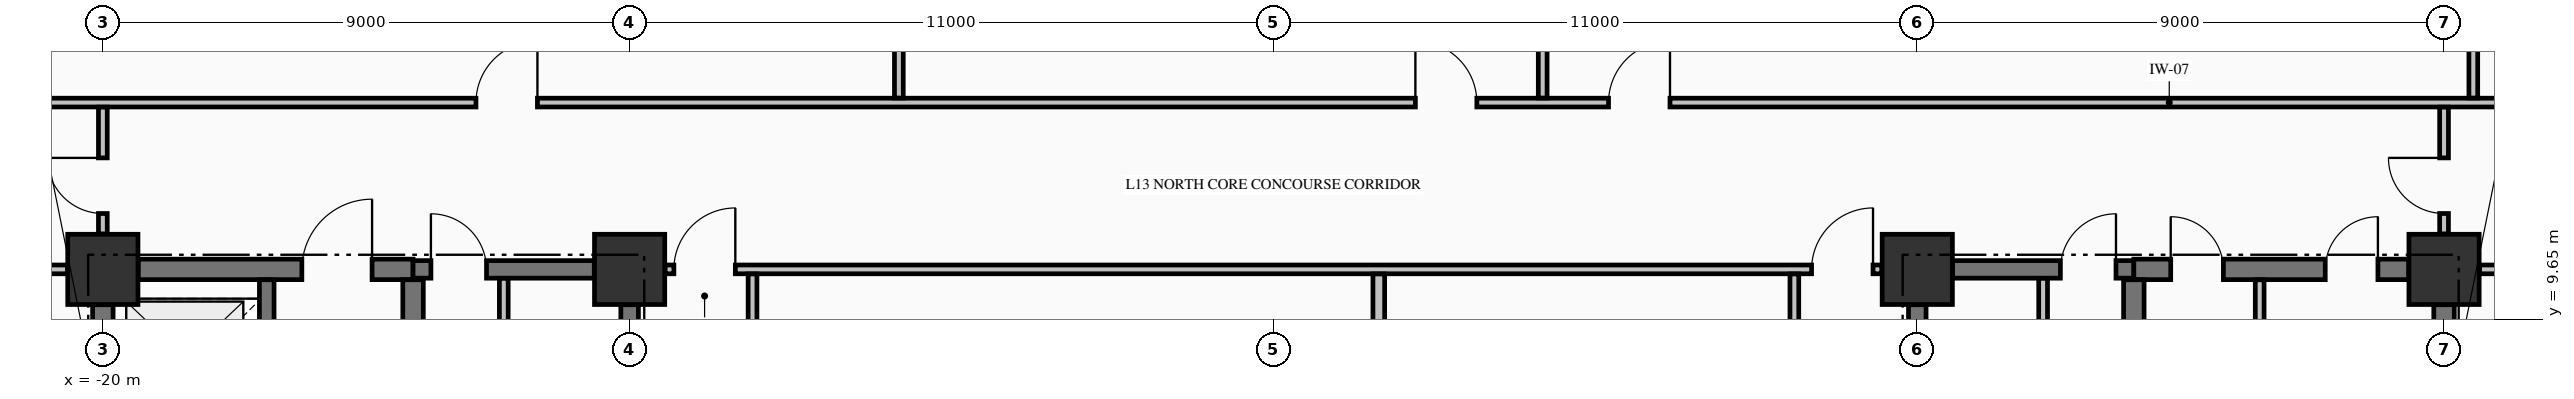
"""IFC4 building model, lengths in metres.
Left out: names, types, materials, properties, quantities, classifications, styles, units other than length and angle.
Written with IfcOpenShell. Run it as: python <this file> out.ifc"""

import sys

from ifc_helpers import new_model, si_unit, direction, frame, frame_2d, origin, origin_2d, place, context, subcontext, project, spatial, rectangle, extrude, element, fill, save


model = new_model("IFC4")
c1 = context("Model", 3, precision=1e-05, world=origin(), true_north=direction((0.0, 1.0)))
c2 = subcontext(c1, "Body", "Model", "MODEL_VIEW")
j1 = project(units=[si_unit("LENGTHUNIT", "METRE"), si_unit("PLANEANGLEUNIT", "RADIAN")], contexts=[c1])
p1 = place(None, origin())
s1 = spatial("IfcSite", under=j1, at=p1, CompositionType="ELEMENT")
p2 = place(p1, origin())
s2 = spatial("IfcBuilding", under=s1, at=p2, CompositionType="ELEMENT")
p3 = place(p2, frame((0.0, 0.0, 57.19)))
s3 = spatial("IfcBuildingStorey", under=s2, at=p3, CompositionType="ELEMENT", Elevation=57.19)
for number, where, z_axis, x_axis in (
    (1, (-20.0, 10.5, -0.425), (0.0, 0.0, 1.0), (1.0, 0.0, 0.0)),
    (2, (-11.0, 10.5, -0.425), (0.0, 0.0, 1.0), (1.0, 0.0, 0.0)),
    (3, (11.0, 10.5, -0.425), (0.0, 0.0, 1.0), (1.0, 0.0, 0.0)),
    (4, (20.0, 10.5, -0.425), (0.0, 0.0, 1.0), (1.0, 0.0, 0.0)),
):
    element("IfcColumn", number, at=place(p3, frame(where, z_axis=z_axis, x_axis=x_axis)), inside=s3, PredefinedType="COLUMN", context=c2, shape_type="SweptSolid", body=[
        extrude(rectangle(XDim=1.2, YDim=1.2, at=origin_2d()), origin(), (0.0, 0.0, 1.0), 3.695),
    ])
p4 = place(p3, frame((-19.396, 10.5, 0.0), z_axis=(0.0, 0.0, 1.0), x_axis=(1.0, 0.0, 0.0)))
e5 = element("IfcWall", 5, at=p4, inside=s3, PredefinedType="SHEAR", context=c2, shape_type="SweptSolid", body=[
    extrude(rectangle(XDim=4.696, YDim=0.35, at=frame_2d((2.348, 0.0))), origin(), (0.0, 0.0, 1.0), 3.27),
])
p5 = place(p4, frame((2.796, 0.0, 0.0)))
e6 = element("IfcOpeningElement", 6, at=p5, cuts=e5, PredefinedType="OPENING", context=c2, shape_type="SweptSolid", body=[
    extrude(rectangle(XDim=1.2, YDim=2.15, at=frame_2d((0.6, 1.075))), frame((0.0, 0.185, 0.0), z_axis=(0.0, -1.0, 0.0), x_axis=(1.0, 0.0, 0.0)), (0.0, 0.0, 1.0), 0.37),
])
p6 = place(p3, frame((-14.7, 10.5, 0.0), z_axis=(0.0, 0.0, 1.0), x_axis=(1.0, 0.0, 0.0)))
e7 = element("IfcWall", 7, at=p6, inside=s3, PredefinedType="SHEAR", context=c2, shape_type="SweptSolid", body=[
    extrude(rectangle(XDim=3.096, YDim=0.3, at=frame_2d((1.548, 0.0))), origin(), (0.0, 0.0, 1.0), 3.27),
])
p7 = place(p6, frame((0.305, 0.0, 0.0)))
e8 = element("IfcOpeningElement", 8, at=p7, cuts=e7, PredefinedType="OPENING", context=c2, shape_type="SweptSolid", body=[
    extrude(rectangle(XDim=0.95, YDim=2.15, at=frame_2d((0.475, 1.075))), frame((0.0, 0.16, 0.0), z_axis=(0.0, -1.0, 0.0), x_axis=(1.0, 0.0, 0.0)), (0.0, 0.0, 1.0), 0.32),
])
p8 = place(p3, frame((11.604, 10.5, 0.0), z_axis=(0.0, 0.0, 1.0), x_axis=(1.0, 0.0, 0.0)))
e9 = element("IfcWall", 9, at=p8, inside=s3, PredefinedType="SHEAR", context=c2, shape_type="SweptSolid", body=[
    extrude(rectangle(XDim=3.096, YDim=0.3, at=frame_2d((1.548, 0.0))), origin(), (0.0, 0.0, 1.0), 3.27),
])
p9 = place(p8, frame((1.841, 0.0, 0.0)))
e10 = element("IfcOpeningElement", 10, at=p9, cuts=e9, PredefinedType="OPENING", context=c2, shape_type="SweptSolid", body=[
    extrude(rectangle(XDim=0.95, YDim=2.15, at=frame_2d((0.475, 1.075))), frame((0.0, 0.16, 0.0), z_axis=(0.0, -1.0, 0.0), x_axis=(1.0, 0.0, 0.0)), (0.0, 0.0, 1.0), 0.32),
])
p10 = place(p3, frame((14.7, 10.5, 0.0), z_axis=(0.0, 0.0, 1.0), x_axis=(1.0, 0.0, 0.0)))
e11 = element("IfcWall", 11, at=p10, inside=s3, PredefinedType="SHEAR", context=c2, shape_type="SweptSolid", body=[
    extrude(rectangle(XDim=4.696, YDim=0.35, at=frame_2d((2.348, 0.0))), origin(), (0.0, 0.0, 1.0), 3.27),
])
p11 = place(p10, frame((0.63, 0.0, 0.0)))
e12 = element("IfcOpeningElement", 12, at=p11, cuts=e11, PredefinedType="OPENING", context=c2, shape_type="SweptSolid", body=[
    extrude(rectangle(XDim=0.9, YDim=2.15, at=frame_2d((0.45, 1.075))), frame((0.0, 0.185, 0.0), z_axis=(0.0, -1.0, 0.0), x_axis=(1.0, 0.0, 0.0)), (0.0, 0.0, 1.0), 0.37),
])
p12 = place(p10, frame((3.27, 0.0, 0.0)))
e13 = element("IfcOpeningElement", 13, at=p12, cuts=e11, PredefinedType="OPENING", context=c2, shape_type="SweptSolid", body=[
    extrude(rectangle(XDim=0.9, YDim=2.15, at=frame_2d((0.45, 1.075))), frame((0.0, 0.185, 0.0), z_axis=(0.0, -1.0, 0.0), x_axis=(1.0, 0.0, 0.0)), (0.0, 0.0, 1.0), 0.37),
])
p13 = place(p3, frame((-28.835, 10.5, 0.0), z_axis=(0.0, 0.0, 1.0), x_axis=(1.0, 0.0, 0.0)))
e14 = element("IfcWall", 14, at=p13, inside=s3, PredefinedType="PARTITIONING", context=c2, shape_type="SweptSolid", body=[
    extrude(rectangle(XDim=8.229, YDim=0.15, at=frame_2d((4.115, 0.0))), origin(), (0.0, 0.0, 1.0), 3.27),
])
p14 = place(p13, frame((3.86, 0.0, 0.0)))
e15 = element("IfcOpeningElement", 15, at=p14, cuts=e14, PredefinedType="OPENING", context=c2, shape_type="SweptSolid", body=[
    extrude(rectangle(XDim=0.95, YDim=2.15, at=frame_2d((0.475, 1.075))), frame((0.0, 0.085, 0.0), z_axis=(0.0, -1.0, 0.0), x_axis=(1.0, 0.0, 0.0)), (0.0, 0.0, 1.0), 0.17),
])
p15 = place(p3, frame((-10.394, 10.5, 0.0), z_axis=(0.0, 0.0, 1.0), x_axis=(1.0, 0.0, 0.0)))
e16 = element("IfcWall", 16, at=p15, inside=s3, PredefinedType="PARTITIONING", context=c2, shape_type="SweptSolid", body=[
    extrude(rectangle(XDim=20.788, YDim=0.15, at=frame_2d((10.394, 0.0))), origin(), (0.0, 0.0, 1.0), 3.27),
])
p16 = place(p15, frame((0.15, 0.0, 0.0)))
e17 = element("IfcOpeningElement", 17, at=p16, cuts=e16, PredefinedType="OPENING", context=c2, shape_type="SweptSolid", body=[
    extrude(rectangle(XDim=1.05, YDim=2.15, at=frame_2d((0.525, 1.075))), frame((0.0, 0.085, 0.0), z_axis=(0.0, -1.0, 0.0), x_axis=(1.0, 0.0, 0.0)), (0.0, 0.0, 1.0), 0.17),
])
p17 = place(p15, frame((19.588, 0.0, 0.0)))
e18 = element("IfcOpeningElement", 18, at=p17, cuts=e16, PredefinedType="OPENING", context=c2, shape_type="SweptSolid", body=[
    extrude(rectangle(XDim=1.05, YDim=2.15, at=frame_2d((0.525, 1.075))), frame((0.0, 0.085, 0.0), z_axis=(0.0, -1.0, 0.0), x_axis=(1.0, 0.0, 0.0)), (0.0, 0.0, 1.0), 0.17),
])
p18 = place(p3, frame((20.606, 10.5, 0.0), z_axis=(0.0, 0.0, 1.0), x_axis=(1.0, 0.0, 0.0)))
e19 = element("IfcWall", 19, at=p18, inside=s3, PredefinedType="PARTITIONING", context=c2, shape_type="SweptSolid", body=[
    extrude(rectangle(XDim=3.229, YDim=0.15, at=frame_2d((1.615, 0.0))), origin(), (0.0, 0.0, 1.0), 3.27),
])
p19 = place(p18, frame((0.894, 0.0, 0.0)))
e20 = element("IfcOpeningElement", 20, at=p19, cuts=e19, PredefinedType="OPENING", context=c2, shape_type="SweptSolid", body=[
    extrude(rectangle(XDim=1.0, YDim=2.15, at=frame_2d((0.5, 1.075))), frame((0.0, 0.085, 0.0), z_axis=(0.0, -1.0, 0.0), x_axis=(1.0, 0.0, 0.0)), (0.0, 0.0, 1.0), 0.17),
])
p20 = place(p3, frame((-28.835, 13.35, 0.0), z_axis=(0.0, 0.0, 1.0), x_axis=(1.0, 0.0, 0.0)))
e21 = element("IfcWall", 21, at=p20, inside=s3, PredefinedType="PARTITIONING", context=c2, shape_type="SweptSolid", body=[
    extrude(rectangle(XDim=52.67, YDim=0.15, at=frame_2d((26.335, 0.0))), origin(), (0.0, 0.0, 1.0), 3.27),
])
p21 = place(p20, frame((15.21, 0.0, 0.0)))
e22 = element("IfcOpeningElement", 22, at=p21, cuts=e21, PredefinedType="OPENING", context=c2, shape_type="SweptSolid", body=[
    extrude(rectangle(XDim=1.05, YDim=2.15, at=frame_2d((0.525, 1.075))), frame((0.0, 0.085, 0.0), z_axis=(0.0, -1.0, 0.0), x_axis=(1.0, 0.0, 0.0)), (0.0, 0.0, 1.0), 0.17),
])
p22 = place(p20, frame((31.26, 0.0, 0.0)))
e23 = element("IfcOpeningElement", 23, at=p22, cuts=e21, PredefinedType="OPENING", context=c2, shape_type="SweptSolid", body=[
    extrude(rectangle(XDim=1.05, YDim=2.15, at=frame_2d((0.525, 1.075))), frame((0.0, 0.085, 0.0), z_axis=(0.0, -1.0, 0.0), x_axis=(1.0, 0.0, 0.0)), (0.0, 0.0, 1.0), 0.17),
])
p23 = place(p20, frame((34.56, 0.0, 0.0)))
e24 = element("IfcOpeningElement", 24, at=p23, cuts=e21, PredefinedType="OPENING", context=c2, shape_type="SweptSolid", body=[
    extrude(rectangle(XDim=1.05, YDim=2.15, at=frame_2d((0.525, 1.075))), frame((0.0, 0.085, 0.0), z_axis=(0.0, -1.0, 0.0), x_axis=(1.0, 0.0, 0.0)), (0.0, 0.0, 1.0), 0.17),
])
p24 = place(p3, frame((-20.0, 7.727, 0.0), z_axis=(0.0, 0.0, 1.0), x_axis=(0.0, 1.0, 0.0)))
e25 = element("IfcWall", 25, at=p24, inside=s3, PredefinedType="SHEAR", context=c2, shape_type="SweptSolid", body=[
    extrude(rectangle(XDim=2.169, YDim=0.35, at=frame_2d((1.084, 0.0))), origin(), (0.0, 0.0, 1.0), 3.27),
])
p25 = place(p3, frame((-17.2, 7.727, 0.0), z_axis=(0.0, 0.0, 1.0), x_axis=(0.0, 1.0, 0.0)))
e26 = element("IfcWall", 26, at=p25, inside=s3, PredefinedType="SOLIDWALL", context=c2, shape_type="SweptSolid", body=[
    extrude(rectangle(XDim=2.596, YDim=0.25, at=frame_2d((1.298, 0.0))), origin(), (0.0, 0.0, 1.0), 3.27),
])
p26 = place(p25, frame((0.773, 0.0, 0.0)))
e27 = element("IfcOpeningElement", 27, at=p26, cuts=e26, PredefinedType="OPENING", context=c2, shape_type="SweptSolid", body=[
    extrude(rectangle(XDim=1.1, YDim=2.2, at=frame_2d((0.55, 1.1))), frame((0.0, 0.135, 0.0), z_axis=(0.0, -1.0, 0.0), x_axis=(1.0, 0.0, 0.0)), (0.0, 0.0, 1.0), 0.27),
])
p27 = place(p3, frame((-14.7, 5.852, 0.0), z_axis=(0.0, 0.0, 1.0), x_axis=(0.0, 1.0, 0.0)))
e28 = element("IfcWall", 28, at=p27, inside=s3, PredefinedType="SHEAR", context=c2, shape_type="SweptSolid", body=[
    extrude(rectangle(XDim=4.471, YDim=0.35, at=frame_2d((2.235, 0.0))), origin(), (0.0, 0.0, 1.0), 3.27),
])
for number, where, z_axis, x_axis in (
    (29, (-11.0, 5.852, 0.0), (0.0, 0.0, 1.0), (0.0, 1.0, 0.0)),
    (30, (11.0, 5.852, 0.0), (0.0, 0.0, 1.0), (0.0, 1.0, 0.0)),
):
    element("IfcWall", number, at=place(p3, frame(where, z_axis=z_axis, x_axis=x_axis)), inside=s3, PredefinedType="SHEAR", context=c2, shape_type="SweptSolid", body=[
        extrude(rectangle(XDim=4.044, YDim=0.3, at=frame_2d((2.022, 0.0))), origin(), (0.0, 0.0, 1.0), 3.27),
    ])
p28 = place(p3, frame((14.7, 5.852, 0.0), z_axis=(0.0, 0.0, 1.0), x_axis=(0.0, 1.0, 0.0)))
e31 = element("IfcWall", 31, at=p28, inside=s3, PredefinedType="SHEAR", context=c2, shape_type="SweptSolid", body=[
    extrude(rectangle(XDim=4.471, YDim=0.35, at=frame_2d((2.235, 0.0))), origin(), (0.0, 0.0, 1.0), 3.27),
])
p29 = place(p3, frame((20.0, 0.604, 0.0), z_axis=(0.0, 0.0, 1.0), x_axis=(0.0, 1.0, 0.0)))
e32 = element("IfcWall", 32, at=p29, inside=s3, PredefinedType="SHEAR", context=c2, shape_type="SweptSolid", body=[
    extrude(rectangle(XDim=9.292, YDim=0.35, at=frame_2d((4.646, 0.0))), origin(), (0.0, 0.0, 1.0), 3.27),
])
p30 = place(p3, frame((-20.0, 11.106, 0.0), z_axis=(0.0, 0.0, 1.0), x_axis=(0.0, 1.0, 0.0)))
e33 = element("IfcWall", 33, at=p30, inside=s3, PredefinedType="PARTITIONING", context=c2, shape_type="SweptSolid", body=[
    extrude(rectangle(XDim=2.166, YDim=0.15, at=frame_2d((1.083, 0.0))), origin(), (0.0, 0.0, 1.0), 2.61),
])
p31 = place(p30, frame((0.349, 0.0, 0.0)))
e34 = element("IfcOpeningElement", 34, at=p31, cuts=e33, PredefinedType="OPENING", context=c2, shape_type="SweptSolid", body=[
    extrude(rectangle(XDim=0.95, YDim=2.15, at=frame_2d((0.475, 1.075))), frame((0.0, 0.085, 0.0), z_axis=(0.0, -1.0, 0.0), x_axis=(1.0, 0.0, 0.0)), (0.0, 0.0, 1.0), 0.17),
])
p32 = place(p3, frame((-13.15, 7.228, 0.0), z_axis=(0.0, 0.0, 1.0), x_axis=(0.0, 1.0, 0.0)))
e35 = element("IfcWall", 35, at=p32, inside=s3, PredefinedType="PARTITIONING", context=c2, shape_type="SweptSolid", body=[
    extrude(rectangle(XDim=3.119, YDim=0.15, at=frame_2d((1.56, 0.0))), origin(), (0.0, 0.0, 1.0), 3.27),
])
p33 = place(p32, frame((1.097, 0.0, 0.0)))
e36 = element("IfcOpeningElement", 36, at=p33, cuts=e35, PredefinedType="OPENING", context=c2, shape_type="SweptSolid", body=[
    extrude(rectangle(XDim=0.95, YDim=2.15, at=frame_2d((0.475, 1.075))), frame((0.0, 0.085, 0.0), z_axis=(0.0, -1.0, 0.0), x_axis=(1.0, 0.0, 0.0)), (0.0, 0.0, 1.0), 0.17),
])
p34 = place(p3, frame((-8.9, 2.303, 0.0), z_axis=(0.0, 0.0, 1.0), x_axis=(0.0, 1.0, 0.0)))
e37 = element("IfcWall", 37, at=p34, inside=s3, PredefinedType="PARTITIONING", context=c2, shape_type="SweptSolid", body=[
    extrude(rectangle(XDim=8.119, YDim=0.15, at=frame_2d((4.06, 0.0))), origin(), (0.0, 0.0, 1.0), 3.27),
])
p35 = place(p34, frame((3.522, 0.0, 0.0)))
e38 = element("IfcOpeningElement", 38, at=p35, cuts=e37, PredefinedType="OPENING", context=c2, shape_type="SweptSolid", body=[
    extrude(rectangle(XDim=1.05, YDim=2.15, at=frame_2d((0.525, 1.075))), frame((0.0, 0.085, 0.0), z_axis=(0.0, -1.0, 0.0), x_axis=(1.0, 0.0, 0.0)), (0.0, 0.0, 1.0), 0.17),
])
p36 = place(p3, frame((-6.4, 13.428, 0.0), z_axis=(0.0, 0.0, 1.0), x_axis=(0.0, 1.0, 0.0)))
e39 = element("IfcWall", 39, at=p36, inside=s3, PredefinedType="PARTITIONING", context=c2, shape_type="SweptSolid", body=[
    extrude(rectangle(XDim=12.907, YDim=0.15, at=frame_2d((6.454, 0.0))), origin(), (0.0, 0.0, 1.0), 3.27),
])
p37 = place(p3, frame((1.8, 2.303, 0.0), z_axis=(0.0, 0.0, 1.0), x_axis=(0.0, 1.0, 0.0)))
e40 = element("IfcWall", 40, at=p37, inside=s3, PredefinedType="PARTITIONING", context=c2, shape_type="SweptSolid", body=[
    extrude(rectangle(XDim=8.119, YDim=0.2, at=frame_2d((4.06, 0.0))), origin(), (0.0, 0.0, 1.0), 3.27),
])
p38 = place(p3, frame((4.6, 13.428, 0.0), z_axis=(0.0, 0.0, 1.0), x_axis=(0.0, 1.0, 0.0)))
e41 = element("IfcWall", 41, at=p38, inside=s3, PredefinedType="PARTITIONING", context=c2, shape_type="SweptSolid", body=[
    extrude(rectangle(XDim=12.907, YDim=0.15, at=frame_2d((6.454, 0.0))), origin(), (0.0, 0.0, 1.0), 3.27),
])
p39 = place(p3, frame((8.9, -1.097, 0.0), z_axis=(0.0, 0.0, 1.0), x_axis=(0.0, 1.0, 0.0)))
e42 = element("IfcWall", 42, at=p39, inside=s3, PredefinedType="PARTITIONING", context=c2, shape_type="SweptSolid", body=[
    extrude(rectangle(XDim=11.519, YDim=0.15, at=frame_2d((5.76, 0.0))), origin(), (0.0, 0.0, 1.0), 3.27),
])
p40 = place(p39, frame((5.197, 0.0, 0.0)))
e43 = element("IfcOpeningElement", 43, at=p40, cuts=e42, PredefinedType="OPENING", context=c2, shape_type="SweptSolid", body=[
    extrude(rectangle(XDim=1.1, YDim=2.15, at=frame_2d((0.55, 1.075))), frame((0.0, 0.085, 0.0), z_axis=(0.0, -1.0, 0.0), x_axis=(1.0, 0.0, 0.0)), (0.0, 0.0, 1.0), 0.17),
])
p41 = place(p3, frame((13.15, 7.228, 0.0), z_axis=(0.0, 0.0, 1.0), x_axis=(0.0, 1.0, 0.0)))
e44 = element("IfcWall", 44, at=p41, inside=s3, PredefinedType="PARTITIONING", context=c2, shape_type="SweptSolid", body=[
    extrude(rectangle(XDim=3.119, YDim=0.15, at=frame_2d((1.56, 0.0))), origin(), (0.0, 0.0, 1.0), 3.27),
])
p42 = place(p41, frame((1.097, 0.0, 0.0)))
e45 = element("IfcOpeningElement", 45, at=p42, cuts=e44, PredefinedType="OPENING", context=c2, shape_type="SweptSolid", body=[
    extrude(rectangle(XDim=0.95, YDim=2.15, at=frame_2d((0.475, 1.075))), frame((0.0, 0.085, 0.0), z_axis=(0.0, -1.0, 0.0), x_axis=(1.0, 0.0, 0.0)), (0.0, 0.0, 1.0), 0.17),
])
p43 = place(p3, frame((16.85, 3.078, 0.0), z_axis=(0.0, 0.0, 1.0), x_axis=(0.0, 1.0, 0.0)))
e46 = element("IfcWall", 46, at=p43, inside=s3, PredefinedType="PARTITIONING", context=c2, shape_type="SweptSolid", body=[
    extrude(rectangle(XDim=7.244, YDim=0.15, at=frame_2d((3.622, 0.0))), origin(), (0.0, 0.0, 1.0), 3.27),
])
p44 = place(p3, frame((20.0, 11.106, 0.0), z_axis=(0.0, 0.0, 1.0), x_axis=(0.0, 1.0, 0.0)))
e47 = element("IfcWall", 47, at=p44, inside=s3, PredefinedType="PARTITIONING", context=c2, shape_type="SweptSolid", body=[
    extrude(rectangle(XDim=2.166, YDim=0.15, at=frame_2d((1.083, 0.0))), origin(), (0.0, 0.0, 1.0), 3.27),
])
p45 = place(p44, frame((0.349, 0.0, 0.0)))
e48 = element("IfcOpeningElement", 48, at=p45, cuts=e47, PredefinedType="OPENING", context=c2, shape_type="SweptSolid", body=[
    extrude(rectangle(XDim=0.95, YDim=2.15, at=frame_2d((0.475, 1.075))), frame((0.0, 0.085, 0.0), z_axis=(0.0, -1.0, 0.0), x_axis=(1.0, 0.0, 0.0)), (0.0, 0.0, 1.0), 0.17),
])
p46 = place(p3, frame((20.5, 13.428, 0.0), z_axis=(0.0, 0.0, 1.0), x_axis=(0.0, 1.0, 0.0)))
e49 = element("IfcWall", 49, at=p46, inside=s3, PredefinedType="PARTITIONING", context=c2, shape_type="SweptSolid", body=[
    extrude(rectangle(XDim=8.866, YDim=0.15, at=frame_2d((4.433, 0.0))), origin(), (0.0, 0.0, 1.0), 3.27),
])
p47 = place(p7, origin())
e50 = element("IfcDoor", 50, at=p47, inside=s3, OperationType="SINGLE_SWING_LEFT", PredefinedType="DOOR", context=c2, shape_type="SweptSolid", body=[
    extrude(rectangle(XDim=0.95, YDim=2.15, at=frame_2d((0.475, 1.075))), frame((0.0, 0.025, 0.0), z_axis=(0.0, -1.0, 0.0), x_axis=(1.0, 0.0, 0.0)), (0.0, 0.0, 1.0), 0.05),
])
fill(e8, e50)
p48 = place(p9, origin())
e51 = element("IfcDoor", 51, at=p48, inside=s3, OperationType="SINGLE_SWING_RIGHT", PredefinedType="DOOR", context=c2, shape_type="SweptSolid", body=[
    extrude(rectangle(XDim=0.95, YDim=2.15, at=frame_2d((0.475, 1.075))), frame((0.0, 0.025, 0.0), z_axis=(0.0, -1.0, 0.0), x_axis=(1.0, 0.0, 0.0)), (0.0, 0.0, 1.0), 0.05),
])
fill(e10, e51)
p49 = place(p5, origin())
e52 = element("IfcDoor", 52, at=p49, inside=s3, OperationType="SINGLE_SWING_RIGHT", PredefinedType="DOOR", context=c2, shape_type="SweptSolid", body=[
    extrude(rectangle(XDim=1.2, YDim=2.15, at=frame_2d((0.6, 1.075))), frame((0.0, 0.025, 0.0), z_axis=(0.0, -1.0, 0.0), x_axis=(1.0, 0.0, 0.0)), (0.0, 0.0, 1.0), 0.05),
])
fill(e6, e52)
p50 = place(p11, origin())
e53 = element("IfcDoor", 53, at=p50, inside=s3, OperationType="SINGLE_SWING_LEFT", PredefinedType="DOOR", context=c2, shape_type="SweptSolid", body=[
    extrude(rectangle(XDim=0.9, YDim=2.15, at=frame_2d((0.45, 1.075))), frame((0.0, 0.025, 0.0), z_axis=(0.0, -1.0, 0.0), x_axis=(1.0, 0.0, 0.0)), (0.0, 0.0, 1.0), 0.05),
])
fill(e12, e53)
p51 = place(p12, origin())
e54 = element("IfcDoor", 54, at=p51, inside=s3, OperationType="SINGLE_SWING_RIGHT", PredefinedType="DOOR", context=c2, shape_type="SweptSolid", body=[
    extrude(rectangle(XDim=0.9, YDim=2.15, at=frame_2d((0.45, 1.075))), frame((0.0, 0.025, 0.0), z_axis=(0.0, -1.0, 0.0), x_axis=(1.0, 0.0, 0.0)), (0.0, 0.0, 1.0), 0.05),
])
fill(e13, e54)
p52 = place(p16, origin())
e55 = element("IfcDoor", 55, at=p52, inside=s3, OperationType="SINGLE_SWING_RIGHT", PredefinedType="DOOR", context=c2, shape_type="SweptSolid", body=[
    extrude(rectangle(XDim=1.05, YDim=2.15, at=frame_2d((0.525, 1.075))), frame((0.0, 0.025, 0.0), z_axis=(0.0, -1.0, 0.0), x_axis=(1.0, 0.0, 0.0)), (0.0, 0.0, 1.0), 0.05),
])
fill(e17, e55)
p53 = place(p17, origin())
e56 = element("IfcDoor", 56, at=p53, inside=s3, OperationType="SINGLE_SWING_RIGHT", PredefinedType="DOOR", context=c2, shape_type="SweptSolid", body=[
    extrude(rectangle(XDim=1.05, YDim=2.15, at=frame_2d((0.525, 1.075))), frame((0.0, 0.025, 0.0), z_axis=(0.0, -1.0, 0.0), x_axis=(1.0, 0.0, 0.0)), (0.0, 0.0, 1.0), 0.05),
])
fill(e18, e56)
p54 = place(p21, origin())
e57 = element("IfcDoor", 57, at=p54, inside=s3, OperationType="SINGLE_SWING_RIGHT", PredefinedType="DOOR", context=c2, shape_type="SweptSolid", body=[
    extrude(rectangle(XDim=1.05, YDim=2.15, at=frame_2d((0.525, 1.075))), frame((0.0, 0.025, 0.0), z_axis=(0.0, -1.0, 0.0), x_axis=(1.0, 0.0, 0.0)), (0.0, 0.0, 1.0), 0.05),
])
fill(e22, e57)
p55 = place(p22, origin())
e58 = element("IfcDoor", 58, at=p55, inside=s3, OperationType="SINGLE_SWING_LEFT", PredefinedType="DOOR", context=c2, shape_type="SweptSolid", body=[
    extrude(rectangle(XDim=1.05, YDim=2.15, at=frame_2d((0.525, 1.075))), frame((0.0, 0.025, 0.0), z_axis=(0.0, -1.0, 0.0), x_axis=(1.0, 0.0, 0.0)), (0.0, 0.0, 1.0), 0.05),
])
fill(e23, e58)
p56 = place(p23, origin())
e59 = element("IfcDoor", 59, at=p56, inside=s3, OperationType="SINGLE_SWING_RIGHT", PredefinedType="DOOR", context=c2, shape_type="SweptSolid", body=[
    extrude(rectangle(XDim=1.05, YDim=2.15, at=frame_2d((0.525, 1.075))), frame((0.0, 0.025, 0.0), z_axis=(0.0, -1.0, 0.0), x_axis=(1.0, 0.0, 0.0)), (0.0, 0.0, 1.0), 0.05),
])
fill(e24, e59)
p57 = place(p31, origin())
e60 = element("IfcDoor", 60, at=p57, inside=s3, OperationType="SINGLE_SWING_RIGHT", PredefinedType="DOOR", context=c2, shape_type="SweptSolid", body=[
    extrude(rectangle(XDim=0.95, YDim=2.15, at=frame_2d((0.475, 1.075))), frame((0.0, 0.025, 0.0), z_axis=(0.0, -1.0, 0.0), x_axis=(1.0, 0.0, 0.0)), (0.0, 0.0, 1.0), 0.05),
])
fill(e34, e60)
p58 = place(p45, origin())
e61 = element("IfcDoor", 61, at=p58, inside=s3, OperationType="SINGLE_SWING_RIGHT", PredefinedType="DOOR", context=c2, shape_type="SweptSolid", body=[
    extrude(rectangle(XDim=0.95, YDim=2.15, at=frame_2d((0.475, 1.075))), frame((0.0, 0.025, 0.0), z_axis=(0.0, -1.0, 0.0), x_axis=(1.0, 0.0, 0.0)), (0.0, 0.0, 1.0), 0.05),
])
fill(e48, e61)
save(model, sys.argv[1])
